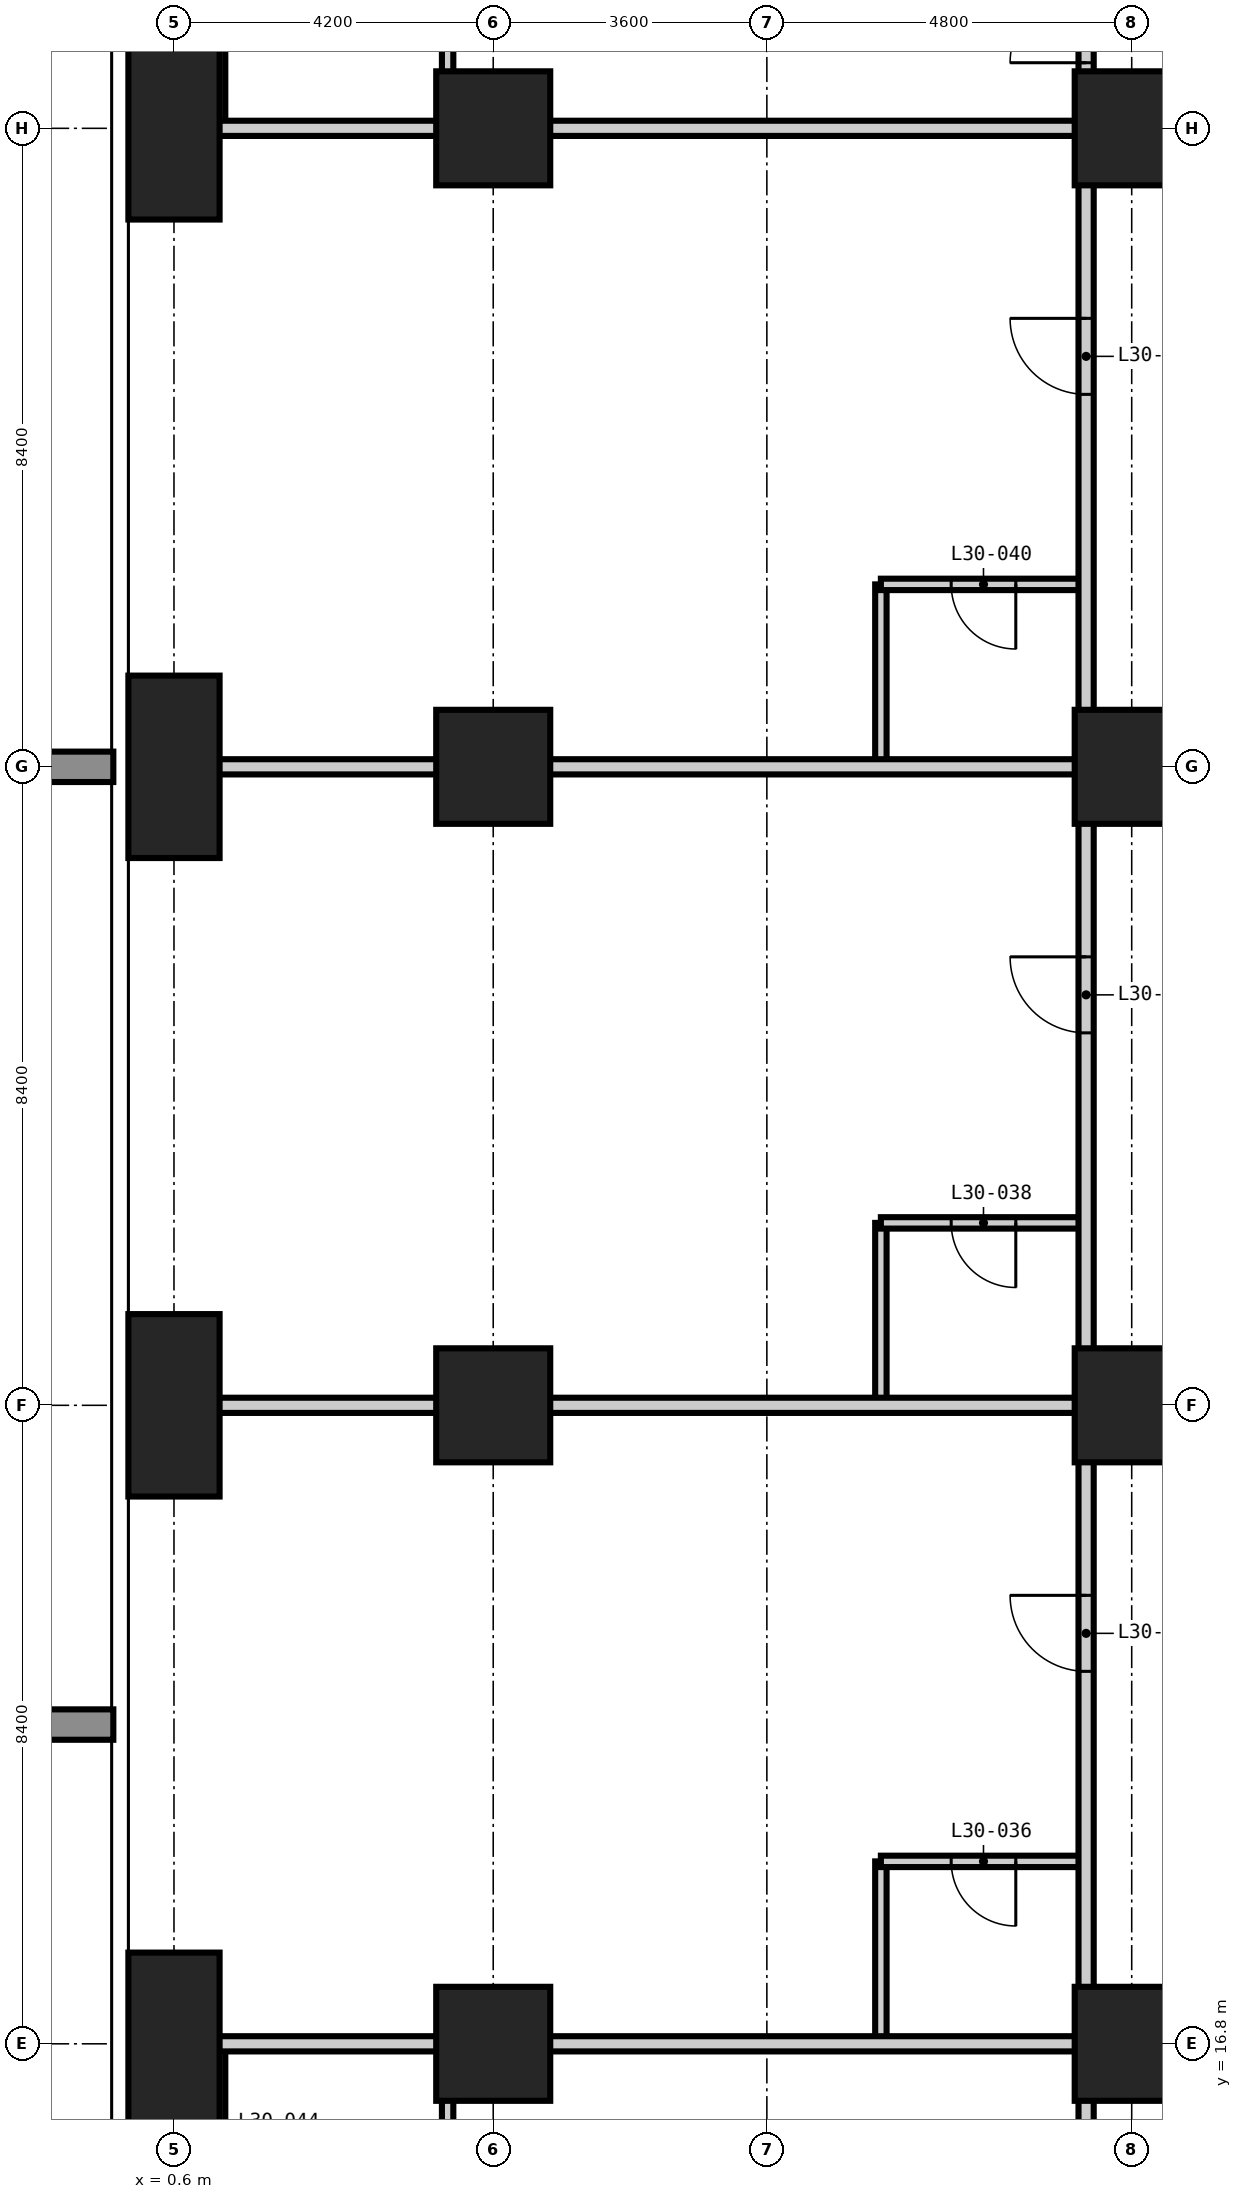
"""IFC4 building model, lengths in metres.
Left out: names, types, materials, properties, quantities, classifications, styles, units other than length and angle.
Written with IfcOpenShell. Run it as: python <this file> out.ifc"""

import sys

from ifc_helpers import new_model, si_unit, direction, frame, frame_2d, origin, origin_2d, place, context, subcontext, project, spatial, rectangle, extrude, element, fill, save


model = new_model("IFC4")
c1 = context("Model", 3, precision=1e-05, world=origin(), true_north=direction((0.0, 1.0)))
c2 = subcontext(c1, "Body", "Model", "MODEL_VIEW")
j1 = project(units=[si_unit("LENGTHUNIT", "METRE"), si_unit("PLANEANGLEUNIT", "RADIAN")], contexts=[c1])
p1 = place(None, origin())
s1 = spatial("IfcSite", under=j1, at=p1, CompositionType="ELEMENT")
p2 = place(p1, origin())
s2 = spatial("IfcBuilding", under=s1, at=p2, CompositionType="ELEMENT")
p3 = place(p2, frame((0.0, 0.0, 118.8)))
s3 = spatial("IfcBuildingStorey", under=s2, at=p3, CompositionType="ELEMENT", Elevation=118.8)
for number, where, z_axis, x_axis in (
    (1, (0.6, 16.8, -0.35), (0.0, 0.0, 1.0), (1.0, 0.0, 0.0)),
    (2, (0.6, 25.2, -0.35), (0.0, 0.0, 1.0), (1.0, 0.0, 0.0)),
    (3, (0.6, 33.6, -0.35), (0.0, 0.0, 1.0), (1.0, 0.0, 0.0)),
    (4, (0.6, 42.0, -0.35), (0.0, 0.0, 1.0), (1.0, 0.0, 0.0)),
):
    element("IfcColumn", number, at=place(p3, frame(where, z_axis=z_axis, x_axis=x_axis)), inside=s3, PredefinedType="COLUMN", context=c2, shape_type="SweptSolid", body=[
        extrude(rectangle(XDim=1.2, YDim=2.4, at=origin_2d()), origin(), (0.0, 0.0, 1.0), 3.6),
    ])
for number, where, z_axis, x_axis in (
    (5, (4.8, 16.8, -0.35), (0.0, 0.0, 1.0), (1.0, 0.0, 0.0)),
    (6, (4.8, 25.2, -0.35), (0.0, 0.0, 1.0), (1.0, 0.0, 0.0)),
    (7, (4.8, 33.6, -0.35), (0.0, 0.0, 1.0), (1.0, 0.0, 0.0)),
    (8, (4.8, 42.0, -0.35), (0.0, 0.0, 1.0), (1.0, 0.0, 0.0)),
    (9, (13.2, 16.8, -0.35), (0.0, 0.0, 1.0), (1.0, 0.0, 0.0)),
    (10, (13.2, 25.2, -0.35), (0.0, 0.0, 1.0), (1.0, 0.0, 0.0)),
    (11, (13.2, 33.6, -0.35), (0.0, 0.0, 1.0), (1.0, 0.0, 0.0)),
    (12, (13.2, 42.0, -0.35), (0.0, 0.0, 1.0), (1.0, 0.0, 0.0)),
):
    element("IfcColumn", number, at=place(p3, frame(where, z_axis=z_axis, x_axis=x_axis)), inside=s3, PredefinedType="COLUMN", context=c2, shape_type="SweptSolid", body=[
        extrude(rectangle(XDim=1.5, YDim=1.5, at=origin_2d()), origin(), (0.0, 0.0, 1.0), 3.6),
    ])
p4 = place(p3, frame((1.2, 13.2, 0.0), z_axis=(0.0, 0.0, 1.0), x_axis=(0.0, 1.0, 0.0)))
e13 = element("IfcWall", 13, at=p4, inside=s3, PredefinedType="PARTITIONING", context=c2, shape_type="SweptSolid", body=[
    extrude(rectangle(XDim=3.6, YDim=0.15, at=frame_2d((1.8, 0.0))), origin(), (0.0, 0.0, 1.0), 3.25),
])
p5 = place(p4, frame((1.375, 0.0, 0.0)))
e14 = element("IfcOpeningElement", 14, at=p5, cuts=e13, PredefinedType="OPENING", context=c2, shape_type="SweptSolid", body=[
    extrude(rectangle(XDim=0.85, YDim=2.1, at=frame_2d((0.425, 1.05))), frame((0.0, 0.085, 0.0), z_axis=(0.0, -1.0, 0.0), x_axis=(1.0, 0.0, 0.0)), (0.0, 0.0, 1.0), 0.17),
])
p6 = place(p3, frame((1.2, 42.0, 0.0), z_axis=(0.0, 0.0, 1.0), x_axis=(0.0, 1.0, 0.0)))
e15 = element("IfcWall", 15, at=p6, inside=s3, PredefinedType="PARTITIONING", context=c2, shape_type="SweptSolid", body=[
    extrude(rectangle(XDim=3.6, YDim=0.15, at=frame_2d((1.8, 0.0))), origin(), (0.0, 0.0, 1.0), 3.25),
])
p7 = place(p6, frame((1.375, 0.0, 0.0)))
e16 = element("IfcOpeningElement", 16, at=p7, cuts=e15, PredefinedType="OPENING", context=c2, shape_type="SweptSolid", body=[
    extrude(rectangle(XDim=0.85, YDim=2.1, at=frame_2d((0.425, 1.05))), frame((0.0, 0.085, 0.0), z_axis=(0.0, -1.0, 0.0), x_axis=(1.0, 0.0, 0.0)), (0.0, 0.0, 1.0), 0.17),
])
p8 = place(p3, frame((9.9, 16.8, 0.0), z_axis=(0.0, 0.0, 1.0), x_axis=(0.0, 1.0, 0.0)))
e17 = element("IfcWall", 17, at=p8, inside=s3, PredefinedType="PARTITIONING", context=c2, shape_type="SweptSolid", body=[
    extrude(rectangle(XDim=2.4, YDim=0.15, at=frame_2d((1.2, 0.0))), origin(), (0.0, 0.0, 1.0), 3.25),
])
p9 = place(p3, frame((9.9, 25.2, 0.0), z_axis=(0.0, 0.0, 1.0), x_axis=(0.0, 1.0, 0.0)))
e18 = element("IfcWall", 18, at=p9, inside=s3, PredefinedType="PARTITIONING", context=c2, shape_type="SweptSolid", body=[
    extrude(rectangle(XDim=2.4, YDim=0.15, at=frame_2d((1.2, 0.0))), origin(), (0.0, 0.0, 1.0), 3.25),
])
p10 = place(p3, frame((9.9, 33.6, 0.0), z_axis=(0.0, 0.0, 1.0), x_axis=(0.0, 1.0, 0.0)))
e19 = element("IfcWall", 19, at=p10, inside=s3, PredefinedType="PARTITIONING", context=c2, shape_type="SweptSolid", body=[
    extrude(rectangle(XDim=2.4, YDim=0.15, at=frame_2d((1.2, 0.0))), origin(), (0.0, 0.0, 1.0), 3.25),
])
p11 = place(p3, frame((9.9, 19.2, 0.0), z_axis=(0.0, 0.0, 1.0), x_axis=(1.0, 0.0, 0.0)))
e20 = element("IfcWall", 20, at=p11, inside=s3, PredefinedType="PARTITIONING", context=c2, shape_type="SweptSolid", body=[
    extrude(rectangle(XDim=2.7, YDim=0.15, at=frame_2d((1.35, 0.0))), origin(), (0.0, 0.0, 1.0), 3.25),
])
p12 = place(p11, frame((0.925, 0.0, 0.0)))
e21 = element("IfcOpeningElement", 21, at=p12, cuts=e20, PredefinedType="OPENING", context=c2, shape_type="SweptSolid", body=[
    extrude(rectangle(XDim=0.85, YDim=2.1, at=frame_2d((0.425, 1.05))), frame((0.0, 0.085, 0.0), z_axis=(0.0, -1.0, 0.0), x_axis=(1.0, 0.0, 0.0)), (0.0, 0.0, 1.0), 0.17),
])
p13 = place(p3, frame((9.9, 27.6, 0.0), z_axis=(0.0, 0.0, 1.0), x_axis=(1.0, 0.0, 0.0)))
e22 = element("IfcWall", 22, at=p13, inside=s3, PredefinedType="PARTITIONING", context=c2, shape_type="SweptSolid", body=[
    extrude(rectangle(XDim=2.7, YDim=0.15, at=frame_2d((1.35, 0.0))), origin(), (0.0, 0.0, 1.0), 3.25),
])
p14 = place(p13, frame((0.925, 0.0, 0.0)))
e23 = element("IfcOpeningElement", 23, at=p14, cuts=e22, PredefinedType="OPENING", context=c2, shape_type="SweptSolid", body=[
    extrude(rectangle(XDim=0.85, YDim=2.1, at=frame_2d((0.425, 1.05))), frame((0.0, 0.085, 0.0), z_axis=(0.0, -1.0, 0.0), x_axis=(1.0, 0.0, 0.0)), (0.0, 0.0, 1.0), 0.17),
])
p15 = place(p3, frame((9.9, 36.0, 0.0), z_axis=(0.0, 0.0, 1.0), x_axis=(1.0, 0.0, 0.0)))
e24 = element("IfcWall", 24, at=p15, inside=s3, PredefinedType="PARTITIONING", context=c2, shape_type="SweptSolid", body=[
    extrude(rectangle(XDim=2.7, YDim=0.15, at=frame_2d((1.35, 0.0))), origin(), (0.0, 0.0, 1.0), 3.25),
])
p16 = place(p15, frame((0.925, 0.0, 0.0)))
e25 = element("IfcOpeningElement", 25, at=p16, cuts=e24, PredefinedType="OPENING", context=c2, shape_type="SweptSolid", body=[
    extrude(rectangle(XDim=0.85, YDim=2.1, at=frame_2d((0.425, 1.05))), frame((0.0, 0.085, 0.0), z_axis=(0.0, -1.0, 0.0), x_axis=(1.0, 0.0, 0.0)), (0.0, 0.0, 1.0), 0.17),
])
p17 = place(p3, frame((12.6, 13.075, 0.0), z_axis=(0.0, 0.0, 1.0), x_axis=(0.0, 1.0, 0.0)))
e26 = element("IfcWall", 26, at=p17, inside=s3, PredefinedType="PARTITIONING", context=c2, shape_type="SweptSolid", body=[
    extrude(rectangle(XDim=31.45, YDim=0.2, at=frame_2d((15.725, 0.0))), origin(), (0.0, 0.0, 1.0), 3.25),
])
p18 = place(p17, frame((8.625, 0.0, 0.0)))
e27 = element("IfcOpeningElement", 27, at=p18, cuts=e26, PredefinedType="OPENING", context=c2, shape_type="SweptSolid", body=[
    extrude(rectangle(XDim=1.0, YDim=2.2, at=frame_2d((0.5, 1.1))), frame((0.0, 0.11, 0.0), z_axis=(0.0, -1.0, 0.0), x_axis=(1.0, 0.0, 0.0)), (0.0, 0.0, 1.0), 0.22),
])
p19 = place(p17, frame((17.025, 0.0, 0.0)))
e28 = element("IfcOpeningElement", 28, at=p19, cuts=e26, PredefinedType="OPENING", context=c2, shape_type="SweptSolid", body=[
    extrude(rectangle(XDim=1.0, YDim=2.2, at=frame_2d((0.5, 1.1))), frame((0.0, 0.11, 0.0), z_axis=(0.0, -1.0, 0.0), x_axis=(1.0, 0.0, 0.0)), (0.0, 0.0, 1.0), 0.22),
])
p20 = place(p17, frame((25.425, 0.0, 0.0)))
e29 = element("IfcOpeningElement", 29, at=p20, cuts=e26, PredefinedType="OPENING", context=c2, shape_type="SweptSolid", body=[
    extrude(rectangle(XDim=1.0, YDim=2.2, at=frame_2d((0.5, 1.1))), frame((0.0, 0.11, 0.0), z_axis=(0.0, -1.0, 0.0), x_axis=(1.0, 0.0, 0.0)), (0.0, 0.0, 1.0), 0.22),
])
p21 = place(p17, frame((1.363, 0.0, 0.0)))
e30 = element("IfcOpeningElement", 30, at=p21, cuts=e26, PredefinedType="OPENING", context=c2, shape_type="SweptSolid", body=[
    extrude(rectangle(XDim=1.0, YDim=2.2, at=frame_2d((0.5, 1.1))), frame((0.0, 0.11, 0.0), z_axis=(0.0, -1.0, 0.0), x_axis=(1.0, 0.0, 0.0)), (0.0, 0.0, 1.0), 0.22),
])
p22 = place(p17, frame((29.788, 0.0, 0.0)))
e31 = element("IfcOpeningElement", 31, at=p22, cuts=e26, PredefinedType="OPENING", context=c2, shape_type="SweptSolid", body=[
    extrude(rectangle(XDim=1.0, YDim=2.2, at=frame_2d((0.5, 1.1))), frame((0.0, 0.11, 0.0), z_axis=(0.0, -1.0, 0.0), x_axis=(1.0, 0.0, 0.0)), (0.0, 0.0, 1.0), 0.22),
])
for number, where, z_axis, x_axis in (
    (32, (-0.018, 16.8, 0.0), (0.0, 0.0, 1.0), (1.0, 0.0, 0.0)),
    (33, (-0.018, 25.2, 0.0), (0.0, 0.0, 1.0), (1.0, 0.0, 0.0)),
    (34, (-0.018, 33.6, 0.0), (0.0, 0.0, 1.0), (1.0, 0.0, 0.0)),
    (35, (-0.018, 42.0, 0.0), (0.0, 0.0, 1.0), (1.0, 0.0, 0.0)),
):
    element("IfcWall", number, at=place(p3, frame(where, z_axis=z_axis, x_axis=x_axis)), inside=s3, PredefinedType="PARTITIONING", context=c2, shape_type="SweptSolid", body=[
        extrude(rectangle(XDim=12.618, YDim=0.2, at=frame_2d((6.309, 0.0))), origin(), (0.0, 0.0, 1.0), 3.25),
    ])
p23 = place(p3, frame((4.2, -0.018, 0.0), z_axis=(0.0, 0.0, 1.0), x_axis=(0.0, 1.0, 0.0)))
e36 = element("IfcWall", 36, at=p23, inside=s3, PredefinedType="PARTITIONING", context=c2, shape_type="SweptSolid", body=[
    extrude(rectangle(XDim=16.818, YDim=0.15, at=frame_2d((8.409, 0.0))), origin(), (0.0, 0.0, 1.0), 3.25),
])
p24 = place(p23, frame((4.968, 0.0, 0.0)))
e37 = element("IfcOpeningElement", 37, at=p24, cuts=e36, PredefinedType="OPENING", context=c2, shape_type="SweptSolid", body=[
    extrude(rectangle(XDim=0.9, YDim=2.1, at=frame_2d((0.45, 1.05))), frame((0.0, 0.085, 0.0), z_axis=(0.0, -1.0, 0.0), x_axis=(1.0, 0.0, 0.0)), (0.0, 0.0, 1.0), 0.17),
])
p25 = place(p3, frame((4.2, 42.0, 0.0), z_axis=(0.0, 0.0, 1.0), x_axis=(0.0, 1.0, 0.0)))
e38 = element("IfcWall", 38, at=p25, inside=s3, PredefinedType="PARTITIONING", context=c2, shape_type="SweptSolid", body=[
    extrude(rectangle(XDim=12.618, YDim=0.15, at=frame_2d((6.309, 0.0))), origin(), (0.0, 0.0, 1.0), 3.25),
])
p26 = place(p25, frame((9.25, 0.0, 0.0)))
e39 = element("IfcOpeningElement", 39, at=p26, cuts=e38, PredefinedType="OPENING", context=c2, shape_type="SweptSolid", body=[
    extrude(rectangle(XDim=0.9, YDim=2.1, at=frame_2d((0.45, 1.05))), frame((0.0, 0.085, 0.0), z_axis=(0.0, -1.0, 0.0), x_axis=(1.0, 0.0, 0.0)), (0.0, 0.0, 1.0), 0.17),
])
p27 = place(p18, origin())
e40 = element("IfcDoor", 40, at=p27, inside=s3, OperationType="SINGLE_SWING_RIGHT", PredefinedType="DOOR", context=c2, shape_type="SweptSolid", body=[
    extrude(rectangle(XDim=1.0, YDim=2.2, at=frame_2d((0.5, 1.1))), frame((0.0, 0.025, 0.0), z_axis=(0.0, -1.0, 0.0), x_axis=(1.0, 0.0, 0.0)), (0.0, 0.0, 1.0), 0.05),
])
fill(e27, e40)
p28 = place(p12, frame((0.85, 0.0, 0.0), z_axis=(0.0, 0.0, 1.0), x_axis=(-1.0, 0.0, 0.0)))
e41 = element("IfcDoor", 41, at=p28, inside=s3, OperationType="SINGLE_SWING_LEFT", PredefinedType="DOOR", context=c2, shape_type="SweptSolid", body=[
    extrude(rectangle(XDim=0.85, YDim=2.1, at=frame_2d((0.425, 1.05))), frame((0.0, 0.025, 0.0), z_axis=(0.0, -1.0, 0.0), x_axis=(1.0, 0.0, 0.0)), (0.0, 0.0, 1.0), 0.05),
])
fill(e21, e41)
p29 = place(p19, origin())
e42 = element("IfcDoor", 42, at=p29, inside=s3, OperationType="SINGLE_SWING_RIGHT", PredefinedType="DOOR", context=c2, shape_type="SweptSolid", body=[
    extrude(rectangle(XDim=1.0, YDim=2.2, at=frame_2d((0.5, 1.1))), frame((0.0, 0.025, 0.0), z_axis=(0.0, -1.0, 0.0), x_axis=(1.0, 0.0, 0.0)), (0.0, 0.0, 1.0), 0.05),
])
fill(e28, e42)
p30 = place(p14, frame((0.85, 0.0, 0.0), z_axis=(0.0, 0.0, 1.0), x_axis=(-1.0, 0.0, 0.0)))
e43 = element("IfcDoor", 43, at=p30, inside=s3, OperationType="SINGLE_SWING_LEFT", PredefinedType="DOOR", context=c2, shape_type="SweptSolid", body=[
    extrude(rectangle(XDim=0.85, YDim=2.1, at=frame_2d((0.425, 1.05))), frame((0.0, 0.025, 0.0), z_axis=(0.0, -1.0, 0.0), x_axis=(1.0, 0.0, 0.0)), (0.0, 0.0, 1.0), 0.05),
])
fill(e23, e43)
p31 = place(p20, origin())
e44 = element("IfcDoor", 44, at=p31, inside=s3, OperationType="SINGLE_SWING_RIGHT", PredefinedType="DOOR", context=c2, shape_type="SweptSolid", body=[
    extrude(rectangle(XDim=1.0, YDim=2.2, at=frame_2d((0.5, 1.1))), frame((0.0, 0.025, 0.0), z_axis=(0.0, -1.0, 0.0), x_axis=(1.0, 0.0, 0.0)), (0.0, 0.0, 1.0), 0.05),
])
fill(e29, e44)
p32 = place(p16, frame((0.85, 0.0, 0.0), z_axis=(0.0, 0.0, 1.0), x_axis=(-1.0, 0.0, 0.0)))
e45 = element("IfcDoor", 45, at=p32, inside=s3, OperationType="SINGLE_SWING_LEFT", PredefinedType="DOOR", context=c2, shape_type="SweptSolid", body=[
    extrude(rectangle(XDim=0.85, YDim=2.1, at=frame_2d((0.425, 1.05))), frame((0.0, 0.025, 0.0), z_axis=(0.0, -1.0, 0.0), x_axis=(1.0, 0.0, 0.0)), (0.0, 0.0, 1.0), 0.05),
])
fill(e25, e45)
p33 = place(p22, origin())
e46 = element("IfcDoor", 46, at=p33, inside=s3, OperationType="SINGLE_SWING_LEFT", PredefinedType="DOOR", context=c2, shape_type="SweptSolid", body=[
    extrude(rectangle(XDim=1.0, YDim=2.2, at=frame_2d((0.5, 1.1))), frame((0.0, 0.025, 0.0), z_axis=(0.0, -1.0, 0.0), x_axis=(1.0, 0.0, 0.0)), (0.0, 0.0, 1.0), 0.05),
])
fill(e31, e46)
save(model, sys.argv[1])
